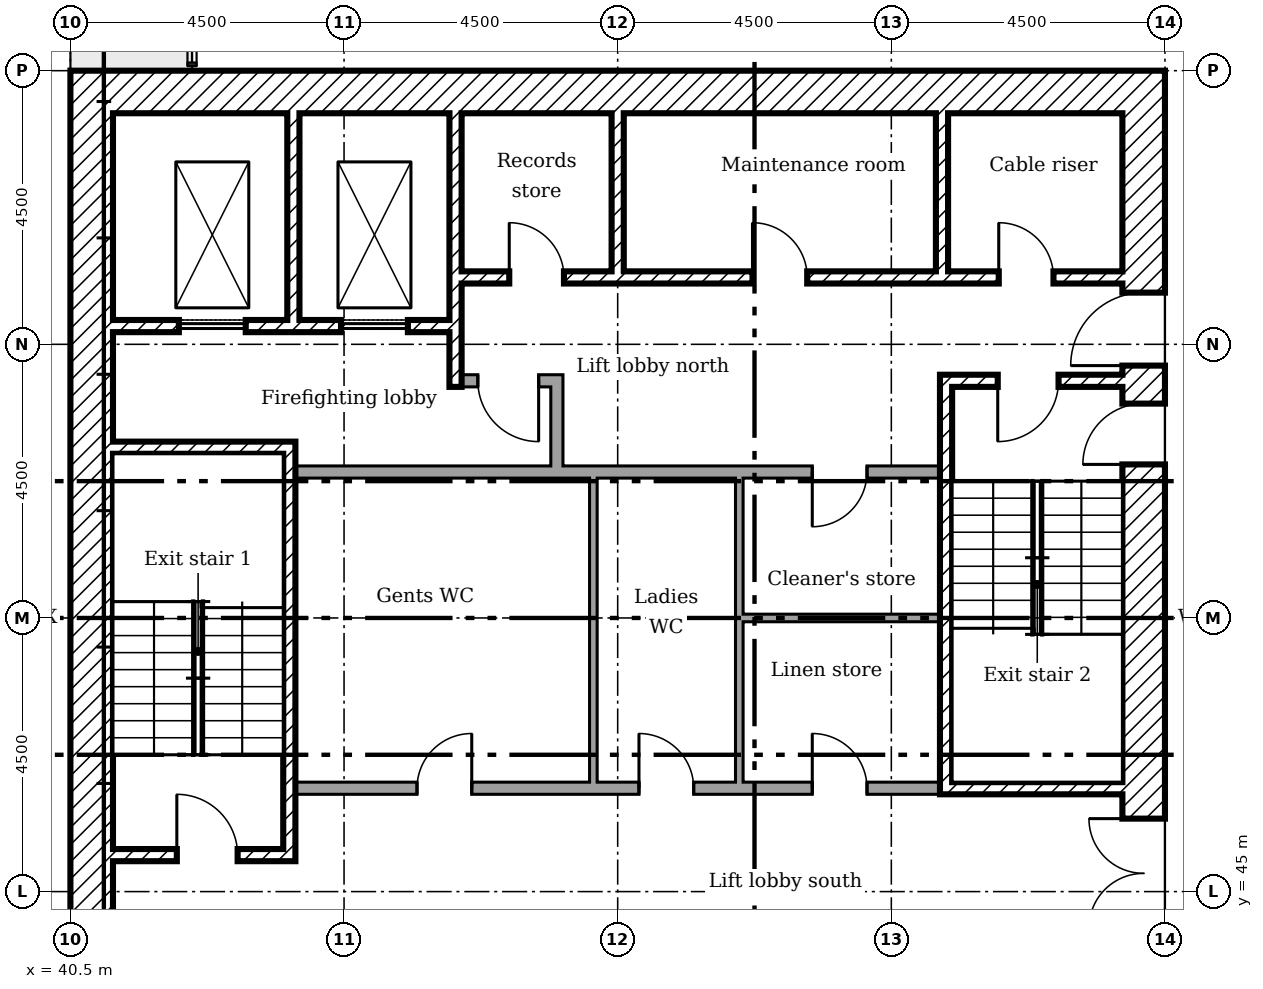
"""IFC4 building model, lengths in metres.
Left out: names, types, materials, properties, quantities, classifications, styles, units other than length and angle.
Written with IfcOpenShell. Run it as: python <this file> out.ifc"""

import sys

from ifc_helpers import new_model, si_unit, direction, frame, frame_2d, origin, place, context, subcontext, project, spatial, rectangle, extrude, element, fill, save


model = new_model("IFC4")
c1 = context("Model", 3, precision=1e-05, world=origin(), true_north=direction((0.0, 1.0)))
c2 = subcontext(c1, "Body", "Model", "MODEL_VIEW")
j1 = project(units=[si_unit("LENGTHUNIT", "METRE"), si_unit("PLANEANGLEUNIT", "RADIAN")], contexts=[c1])
p1 = place(None, origin())
s1 = spatial("IfcSite", under=j1, at=p1, CompositionType="ELEMENT")
p2 = place(p1, origin())
s2 = spatial("IfcBuilding", under=s1, at=p2, CompositionType="ELEMENT")
p3 = place(p2, frame((0.0, 0.0, 128.0)))
s3 = spatial("IfcBuildingStorey", under=s2, at=p3, CompositionType="ELEMENT", Elevation=128.0)
p4 = place(p3, frame((58.15, 40.5, 0.0), z_axis=(0.0, 0.0, 1.0), x_axis=(0.0, 1.0, 0.0)))
e1 = element("IfcWall", 1, at=p4, inside=s3, PredefinedType="SHEAR", context=c2, shape_type="SweptSolid", body=[
    extrude(rectangle(XDim=18.0, YDim=0.7, at=frame_2d((9.0, 0.0))), origin(), (0.0, 0.0, 1.0), 3.35),
])
p5 = place(p4, frame((13.15, 0.0, 0.0)))
e2 = element("IfcOpeningElement", 2, at=p5, cuts=e1, PredefinedType="OPENING", context=c2, shape_type="SweptSolid", body=[
    extrude(rectangle(XDim=1.2, YDim=2.1, at=frame_2d((0.6, 1.05))), frame((0.0, 0.36, 0.0), z_axis=(0.0, -1.0, 0.0), x_axis=(1.0, 0.0, 0.0)), (0.0, 0.0, 1.0), 0.72),
])
p6 = place(p4, frame((3.9, 0.0, 0.0)))
e3 = element("IfcOpeningElement", 3, at=p6, cuts=e1, PredefinedType="OPENING", context=c2, shape_type="SweptSolid", body=[
    extrude(rectangle(XDim=1.8, YDim=2.1, at=frame_2d((0.9, 1.05))), frame((0.0, 0.36, 0.0), z_axis=(0.0, -1.0, 0.0), x_axis=(1.0, 0.0, 0.0)), (0.0, 0.0, 1.0), 0.72),
])
p7 = place(p4, frame((11.525, 0.0, 0.0)))
e4 = element("IfcOpeningElement", 4, at=p7, cuts=e1, PredefinedType="OPENING", context=c2, shape_type="SweptSolid", body=[
    extrude(rectangle(XDim=1.0, YDim=2.1, at=frame_2d((0.5, 1.05))), frame((0.0, 0.36, 0.0), z_axis=(0.0, -1.0, 0.0), x_axis=(1.0, 0.0, 0.0)), (0.0, 0.0, 1.0), 0.72),
])
p8 = place(p3, frame((41.2, 58.15, 0.0)))
e5 = element("IfcWall", 5, at=p8, inside=s3, PredefinedType="SHEAR", context=c2, shape_type="SweptSolid", body=[
    extrude(rectangle(XDim=16.6, YDim=0.7, at=frame_2d((8.3, 0.0))), origin(), (0.0, 0.0, 1.0), 3.35),
])
p9 = place(p3, frame((40.85, 40.5, 0.0), z_axis=(0.0, 0.0, 1.0), x_axis=(0.0, 1.0, 0.0)))
e6 = element("IfcWall", 6, at=p9, inside=s3, PredefinedType="SHEAR", context=c2, shape_type="SweptSolid", body=[
    extrude(rectangle(XDim=18.0, YDim=0.7, at=frame_2d((9.0, 0.0))), origin(), (0.0, 0.0, 1.0), 3.35),
])
p10 = place(p3, frame((44.167, 57.8, 0.0), z_axis=(0.0, 0.0, 1.0), x_axis=(0.0, -1.0, 0.0)))
e7 = element("IfcWall", 7, at=p10, inside=s3, PredefinedType="SHEAR", context=c2, shape_type="SweptSolid", body=[
    extrude(rectangle(XDim=3.4, YDim=0.2, at=frame_2d((1.7, 0.0))), origin(), (0.0, 0.0, 1.0), 3.35),
])
p11 = place(p3, frame((46.833, 57.8, 0.0), z_axis=(0.0, 0.0, 1.0), x_axis=(0.0, -1.0, 0.0)))
e8 = element("IfcWall", 8, at=p11, inside=s3, PredefinedType="SHEAR", context=c2, shape_type="SweptSolid", body=[
    extrude(rectangle(XDim=4.5, YDim=0.2, at=frame_2d((2.25, 0.0))), origin(), (0.0, 0.0, 1.0), 3.35),
])
for number, where, z_axis, x_axis in (
    (9, (49.5, 57.8, 0.0), (0.0, 0.0, 1.0), (0.0, -1.0, 0.0)),
    (10, (54.833, 57.8, 0.0), (0.0, 0.0, 1.0), (0.0, -1.0, 0.0)),
):
    element("IfcWall", number, at=place(p3, frame(where, z_axis=z_axis, x_axis=x_axis)), inside=s3, PredefinedType="SHEAR", context=c2, shape_type="SweptSolid", body=[
        extrude(rectangle(XDim=2.6, YDim=0.2, at=frame_2d((1.3, 0.0))), origin(), (0.0, 0.0, 1.0), 3.35),
    ])
p12 = place(p3, frame((48.5, 51.9, 0.0), z_axis=(0.0, 0.0, 1.0), x_axis=(0.0, 1.0, 0.0)))
e11 = element("IfcWall", 11, at=p12, inside=s3, PredefinedType="PARTITIONING", context=c2, shape_type="SweptSolid", body=[
    extrude(rectangle(XDim=1.6, YDim=0.2, at=frame_2d((0.8, 0.0))), origin(), (0.0, 0.0, 1.0), 3.35),
])
p13 = place(p3, frame((46.933, 53.4, 0.0)))
e12 = element("IfcWall", 12, at=p13, inside=s3, PredefinedType="PARTITIONING", context=c2, shape_type="SweptSolid", body=[
    extrude(rectangle(XDim=1.467, YDim=0.2, at=frame_2d((0.733, 0.0))), origin(), (0.0, 0.0, 1.0), 3.35),
])
p14 = place(p13, frame((0.267, 0.0, 0.0)))
e13 = element("IfcOpeningElement", 13, at=p14, cuts=e12, PredefinedType="OPENING", context=c2, shape_type="SweptSolid", body=[
    extrude(rectangle(XDim=1.0, YDim=2.1, at=frame_2d((0.5, 1.05))), frame((0.0, 0.11, 0.0), z_axis=(0.0, -1.0, 0.0), x_axis=(1.0, 0.0, 0.0)), (0.0, 0.0, 1.0), 0.22),
])
p15 = place(p3, frame((46.933, 55.1, 0.0)))
e14 = element("IfcWall", 14, at=p15, inside=s3, PredefinedType="SHEAR", context=c2, shape_type="SweptSolid", body=[
    extrude(rectangle(XDim=10.867, YDim=0.2, at=frame_2d((5.433, 0.0))), origin(), (0.0, 0.0, 1.0), 3.35),
])
p16 = place(p15, frame((8.833, 0.0, 0.0)))
e15 = element("IfcOpeningElement", 15, at=p16, cuts=e14, PredefinedType="OPENING", context=c2, shape_type="SweptSolid", body=[
    extrude(rectangle(XDim=0.9, YDim=2.1, at=frame_2d((0.45, 1.05))), frame((0.0, 0.11, 0.0), z_axis=(0.0, -1.0, 0.0), x_axis=(1.0, 0.0, 0.0)), (0.0, 0.0, 1.0), 0.22),
])
p17 = place(p15, frame((0.783, 0.0, 0.0)))
e16 = element("IfcOpeningElement", 16, at=p17, cuts=e14, PredefinedType="OPENING", context=c2, shape_type="SweptSolid", body=[
    extrude(rectangle(XDim=0.9, YDim=2.1, at=frame_2d((0.45, 1.05))), frame((0.0, 0.11, 0.0), z_axis=(0.0, -1.0, 0.0), x_axis=(1.0, 0.0, 0.0)), (0.0, 0.0, 1.0), 0.22),
])
p18 = place(p15, frame((4.783, 0.0, 0.0)))
e17 = element("IfcOpeningElement", 17, at=p18, cuts=e14, PredefinedType="OPENING", context=c2, shape_type="SweptSolid", body=[
    extrude(rectangle(XDim=0.9, YDim=2.1, at=frame_2d((0.45, 1.05))), frame((0.0, 0.11, 0.0), z_axis=(0.0, -1.0, 0.0), x_axis=(1.0, 0.0, 0.0)), (0.0, 0.0, 1.0), 0.22),
])
p19 = place(p3, frame((41.2, 54.3, 0.0)))
e18 = element("IfcWall", 18, at=p19, inside=s3, PredefinedType="SHEAR", context=c2, shape_type="SweptSolid", body=[
    extrude(rectangle(XDim=5.533, YDim=0.2, at=frame_2d((2.767, 0.0))), origin(), (0.0, 0.0, 1.0), 3.35),
])
p20 = place(p19, frame((1.083, 0.0, 0.0)))
e19 = element("IfcOpeningElement", 19, at=p20, cuts=e18, PredefinedType="OPENING", context=c2, shape_type="SweptSolid", body=[
    extrude(rectangle(XDim=1.1, YDim=2.1, at=frame_2d((0.55, 1.05))), frame((0.0, 0.11, 0.0), z_axis=(0.0, -1.0, 0.0), x_axis=(1.0, 0.0, 0.0)), (0.0, 0.0, 1.0), 0.22),
])
p21 = place(p19, frame((3.75, 0.0, 0.0)))
e20 = element("IfcOpeningElement", 20, at=p21, cuts=e18, PredefinedType="OPENING", context=c2, shape_type="SweptSolid", body=[
    extrude(rectangle(XDim=1.1, YDim=2.1, at=frame_2d((0.55, 1.05))), frame((0.0, 0.11, 0.0), z_axis=(0.0, -1.0, 0.0), x_axis=(1.0, 0.0, 0.0)), (0.0, 0.0, 1.0), 0.22),
])
p22 = place(p3, frame((44.1, 45.5, 0.0), z_axis=(0.0, 0.0, 1.0), x_axis=(0.0, 1.0, 0.0)))
e21 = element("IfcWall", 21, at=p22, inside=s3, PredefinedType="SHEAR", context=c2, shape_type="SweptSolid", body=[
    extrude(rectangle(XDim=6.9, YDim=0.2, at=frame_2d((3.45, 0.0))), origin(), (0.0, 0.0, 1.0), 3.35),
])
p23 = place(p3, frame((41.2, 52.3, 0.0)))
e22 = element("IfcWall", 22, at=p23, inside=s3, PredefinedType="SHEAR", context=c2, shape_type="SweptSolid", body=[
    extrude(rectangle(XDim=2.8, YDim=0.2, at=frame_2d((1.4, 0.0))), origin(), (0.0, 0.0, 1.0), 3.35),
])
p24 = place(p3, frame((41.2, 45.6, 0.0)))
e23 = element("IfcWall", 23, at=p24, inside=s3, PredefinedType="SHEAR", context=c2, shape_type="SweptSolid", body=[
    extrude(rectangle(XDim=2.8, YDim=0.2, at=frame_2d((1.4, 0.0))), origin(), (0.0, 0.0, 1.0), 3.35),
])
p25 = place(p24, frame((1.05, 0.0, 0.0)))
e24 = element("IfcOpeningElement", 24, at=p25, cuts=e23, PredefinedType="OPENING", context=c2, shape_type="SweptSolid", body=[
    extrude(rectangle(XDim=1.0, YDim=2.1, at=frame_2d((0.5, 1.05))), frame((0.0, 0.11, 0.0), z_axis=(0.0, -1.0, 0.0), x_axis=(1.0, 0.0, 0.0)), (0.0, 0.0, 1.0), 0.22),
])
p26 = place(p3, frame((54.8, 53.4, 0.0)))
e25 = element("IfcWall", 25, at=p26, inside=s3, PredefinedType="SHEAR", context=c2, shape_type="SweptSolid", body=[
    extrude(rectangle(XDim=3.0, YDim=0.2, at=frame_2d((1.5, 0.0))), origin(), (0.0, 0.0, 1.0), 3.35),
])
p27 = place(p26, frame((0.95, 0.0, 0.0)))
e26 = element("IfcOpeningElement", 26, at=p27, cuts=e25, PredefinedType="OPENING", context=c2, shape_type="SweptSolid", body=[
    extrude(rectangle(XDim=1.0, YDim=2.1, at=frame_2d((0.5, 1.05))), frame((0.0, 0.11, 0.0), z_axis=(0.0, -1.0, 0.0), x_axis=(1.0, 0.0, 0.0)), (0.0, 0.0, 1.0), 0.22),
])
p28 = place(p3, frame((54.8, 46.7, 0.0)))
e27 = element("IfcWall", 27, at=p28, inside=s3, PredefinedType="SHEAR", context=c2, shape_type="SweptSolid", body=[
    extrude(rectangle(XDim=3.0, YDim=0.2, at=frame_2d((1.5, 0.0))), origin(), (0.0, 0.0, 1.0), 3.35),
])
p29 = place(p3, frame((54.9, 46.8, 0.0), z_axis=(0.0, 0.0, 1.0), x_axis=(0.0, 1.0, 0.0)))
e28 = element("IfcWall", 28, at=p29, inside=s3, PredefinedType="SHEAR", context=c2, shape_type="SweptSolid", body=[
    extrude(rectangle(XDim=6.5, YDim=0.2, at=frame_2d((3.25, 0.0))), origin(), (0.0, 0.0, 1.0), 3.35),
])
p30 = place(p3, frame((44.2, 51.9, 0.0)))
e29 = element("IfcWall", 29, at=p30, inside=s3, PredefinedType="PARTITIONING", context=c2, shape_type="SweptSolid", body=[
    extrude(rectangle(XDim=10.6, YDim=0.2, at=frame_2d((5.3, 0.0))), origin(), (0.0, 0.0, 1.0), 3.35),
])
p31 = place(p30, frame((8.5, 0.0, 0.0)))
e30 = element("IfcOpeningElement", 30, at=p31, cuts=e29, PredefinedType="OPENING", context=c2, shape_type="SweptSolid", body=[
    extrude(rectangle(XDim=0.9, YDim=2.1, at=frame_2d((0.45, 1.05))), frame((0.0, 0.11, 0.0), z_axis=(0.0, -1.0, 0.0), x_axis=(1.0, 0.0, 0.0)), (0.0, 0.0, 1.0), 0.22),
])
p32 = place(p3, frame((44.2, 46.7, 0.0)))
e31 = element("IfcWall", 31, at=p32, inside=s3, PredefinedType="PARTITIONING", context=c2, shape_type="SweptSolid", body=[
    extrude(rectangle(XDim=10.6, YDim=0.2, at=frame_2d((5.3, 0.0))), origin(), (0.0, 0.0, 1.0), 3.35),
])
p33 = place(p32, frame((2.0, 0.0, 0.0)))
e32 = element("IfcOpeningElement", 32, at=p33, cuts=e31, PredefinedType="OPENING", context=c2, shape_type="SweptSolid", body=[
    extrude(rectangle(XDim=0.9, YDim=2.1, at=frame_2d((0.45, 1.05))), frame((0.0, 0.11, 0.0), z_axis=(0.0, -1.0, 0.0), x_axis=(1.0, 0.0, 0.0)), (0.0, 0.0, 1.0), 0.22),
])
p34 = place(p32, frame((5.65, 0.0, 0.0)))
e33 = element("IfcOpeningElement", 33, at=p34, cuts=e31, PredefinedType="OPENING", context=c2, shape_type="SweptSolid", body=[
    extrude(rectangle(XDim=0.9, YDim=2.1, at=frame_2d((0.45, 1.05))), frame((0.0, 0.11, 0.0), z_axis=(0.0, -1.0, 0.0), x_axis=(1.0, 0.0, 0.0)), (0.0, 0.0, 1.0), 0.22),
])
p35 = place(p32, frame((8.5, 0.0, 0.0)))
e34 = element("IfcOpeningElement", 34, at=p35, cuts=e31, PredefinedType="OPENING", context=c2, shape_type="SweptSolid", body=[
    extrude(rectangle(XDim=0.9, YDim=2.1, at=frame_2d((0.45, 1.05))), frame((0.0, 0.11, 0.0), z_axis=(0.0, -1.0, 0.0), x_axis=(1.0, 0.0, 0.0)), (0.0, 0.0, 1.0), 0.22),
])
p36 = place(p3, frame((49.1, 46.8, 0.0), z_axis=(0.0, 0.0, 1.0), x_axis=(0.0, 1.0, 0.0)))
e35 = element("IfcWall", 35, at=p36, inside=s3, PredefinedType="PARTITIONING", context=c2, shape_type="SweptSolid", body=[
    extrude(rectangle(XDim=5.0, YDim=0.125, at=frame_2d((2.5, 0.0))), origin(), (0.0, 0.0, 1.0), 3.35),
])
p37 = place(p3, frame((51.5, 46.8, 0.0), z_axis=(0.0, 0.0, 1.0), x_axis=(0.0, 1.0, 0.0)))
e36 = element("IfcWall", 36, at=p37, inside=s3, PredefinedType="PARTITIONING", context=c2, shape_type="SweptSolid", body=[
    extrude(rectangle(XDim=2.762, YDim=0.125, at=frame_2d((1.381, 0.0))), origin(), (0.0, 0.0, 1.0), 3.35),
])
p38 = place(p3, frame((51.562, 49.5, 0.0)))
e37 = element("IfcWall", 37, at=p38, inside=s3, PredefinedType="PARTITIONING", context=c2, shape_type="SweptSolid", body=[
    extrude(rectangle(XDim=3.238, YDim=0.125, at=frame_2d((1.619, 0.0))), origin(), (0.0, 0.0, 1.0), 3.35),
])
p39 = place(p3, frame((51.5, 49.5, 0.0), z_axis=(0.0, 0.0, 1.0), x_axis=(0.0, 1.0, 0.0)))
e38 = element("IfcWall", 38, at=p39, inside=s3, PredefinedType="PARTITIONING", context=c2, shape_type="SweptSolid", body=[
    extrude(rectangle(XDim=2.3, YDim=0.125, at=frame_2d((1.15, 0.0))), origin(), (0.0, 0.0, 1.0), 3.35),
])
p40 = place(p5, origin())
e39 = element("IfcDoor", 39, at=p40, inside=s3, OperationType="SINGLE_SWING_RIGHT", PredefinedType="DOOR", context=c2, shape_type="SweptSolid", body=[
    extrude(rectangle(XDim=1.2, YDim=2.1, at=frame_2d((0.6, 1.05))), frame((0.0, 0.025, 0.0), z_axis=(0.0, -1.0, 0.0), x_axis=(1.0, 0.0, 0.0)), (0.0, 0.0, 1.0), 0.05),
])
fill(e2, e39)
p41 = place(p6, origin())
e40 = element("IfcDoor", 40, at=p41, inside=s3, OperationType="DOUBLE_DOOR_SINGLE_SWING", PredefinedType="DOOR", context=c2, shape_type="SweptSolid", body=[
    extrude(rectangle(XDim=1.8, YDim=2.1, at=frame_2d((0.9, 1.05))), frame((0.0, 0.025, 0.0), z_axis=(0.0, -1.0, 0.0), x_axis=(1.0, 0.0, 0.0)), (0.0, 0.0, 1.0), 0.05),
])
fill(e3, e40)
p42 = place(p25, origin())
e41 = element("IfcDoor", 41, at=p42, inside=s3, OperationType="SINGLE_SWING_RIGHT", PredefinedType="DOOR", context=c2, shape_type="SweptSolid", body=[
    extrude(rectangle(XDim=1.0, YDim=2.1, at=frame_2d((0.5, 1.05))), frame((0.0, 0.025, 0.0), z_axis=(0.0, -1.0, 0.0), x_axis=(1.0, 0.0, 0.0)), (0.0, 0.0, 1.0), 0.05),
])
fill(e24, e41)
p43 = place(p27, frame((1.0, 0.0, 0.0), x_axis=(-1.0, 0.0, 0.0)))
e42 = element("IfcDoor", 42, at=p43, inside=s3, OperationType="SINGLE_SWING_LEFT", PredefinedType="DOOR", context=c2, shape_type="SweptSolid", body=[
    extrude(rectangle(XDim=1.0, YDim=2.1, at=frame_2d((0.5, 1.05))), frame((0.0, 0.025, 0.0), z_axis=(0.0, -1.0, 0.0), x_axis=(1.0, 0.0, 0.0)), (0.0, 0.0, 1.0), 0.05),
])
fill(e26, e42)
p44 = place(p7, origin())
e43 = element("IfcDoor", 43, at=p44, inside=s3, OperationType="SINGLE_SWING_RIGHT", PredefinedType="DOOR", context=c2, shape_type="SweptSolid", body=[
    extrude(rectangle(XDim=1.0, YDim=2.1, at=frame_2d((0.5, 1.05))), frame((0.0, 0.025, 0.0), z_axis=(0.0, -1.0, 0.0), x_axis=(1.0, 0.0, 0.0)), (0.0, 0.0, 1.0), 0.05),
])
fill(e4, e43)
p45 = place(p14, frame((1.0, 0.0, 0.0), x_axis=(-1.0, 0.0, 0.0)))
e44 = element("IfcDoor", 44, at=p45, inside=s3, OperationType="SINGLE_SWING_RIGHT", PredefinedType="DOOR", context=c2, shape_type="SweptSolid", body=[
    extrude(rectangle(XDim=1.0, YDim=2.1, at=frame_2d((0.5, 1.05))), frame((0.0, 0.025, 0.0), z_axis=(0.0, -1.0, 0.0), x_axis=(1.0, 0.0, 0.0)), (0.0, 0.0, 1.0), 0.05),
])
fill(e13, e44)
p46 = place(p16, origin())
e45 = element("IfcDoor", 45, at=p46, inside=s3, OperationType="SINGLE_SWING_RIGHT", PredefinedType="DOOR", context=c2, shape_type="SweptSolid", body=[
    extrude(rectangle(XDim=0.9, YDim=2.1, at=frame_2d((0.45, 1.05))), frame((0.0, 0.025, 0.0), z_axis=(0.0, -1.0, 0.0), x_axis=(1.0, 0.0, 0.0)), (0.0, 0.0, 1.0), 0.05),
])
fill(e15, e45)
p47 = place(p17, origin())
e46 = element("IfcDoor", 46, at=p47, inside=s3, OperationType="SINGLE_SWING_RIGHT", PredefinedType="DOOR", context=c2, shape_type="SweptSolid", body=[
    extrude(rectangle(XDim=0.9, YDim=2.1, at=frame_2d((0.45, 1.05))), frame((0.0, 0.025, 0.0), z_axis=(0.0, -1.0, 0.0), x_axis=(1.0, 0.0, 0.0)), (0.0, 0.0, 1.0), 0.05),
])
fill(e16, e46)
p48 = place(p18, origin())
e47 = element("IfcDoor", 47, at=p48, inside=s3, OperationType="SINGLE_SWING_RIGHT", PredefinedType="DOOR", context=c2, shape_type="SweptSolid", body=[
    extrude(rectangle(XDim=0.9, YDim=2.1, at=frame_2d((0.45, 1.05))), frame((0.0, 0.025, 0.0), z_axis=(0.0, -1.0, 0.0), x_axis=(1.0, 0.0, 0.0)), (0.0, 0.0, 1.0), 0.05),
])
fill(e17, e47)
p49 = place(p33, origin())
e48 = element("IfcDoor", 48, at=p49, inside=s3, OperationType="SINGLE_SWING_LEFT", PredefinedType="DOOR", context=c2, shape_type="SweptSolid", body=[
    extrude(rectangle(XDim=0.9, YDim=2.1, at=frame_2d((0.45, 1.05))), frame((0.0, 0.025, 0.0), z_axis=(0.0, -1.0, 0.0), x_axis=(1.0, 0.0, 0.0)), (0.0, 0.0, 1.0), 0.05),
])
fill(e32, e48)
p50 = place(p34, origin())
e49 = element("IfcDoor", 49, at=p50, inside=s3, OperationType="SINGLE_SWING_RIGHT", PredefinedType="DOOR", context=c2, shape_type="SweptSolid", body=[
    extrude(rectangle(XDim=0.9, YDim=2.1, at=frame_2d((0.45, 1.05))), frame((0.0, 0.025, 0.0), z_axis=(0.0, -1.0, 0.0), x_axis=(1.0, 0.0, 0.0)), (0.0, 0.0, 1.0), 0.05),
])
fill(e33, e49)
p51 = place(p31, frame((0.9, 0.0, 0.0), x_axis=(-1.0, 0.0, 0.0)))
e50 = element("IfcDoor", 50, at=p51, inside=s3, OperationType="SINGLE_SWING_LEFT", PredefinedType="DOOR", context=c2, shape_type="SweptSolid", body=[
    extrude(rectangle(XDim=0.9, YDim=2.1, at=frame_2d((0.45, 1.05))), frame((0.0, 0.025, 0.0), z_axis=(0.0, -1.0, 0.0), x_axis=(1.0, 0.0, 0.0)), (0.0, 0.0, 1.0), 0.05),
])
fill(e30, e50)
p52 = place(p35, origin())
e51 = element("IfcDoor", 51, at=p52, inside=s3, OperationType="SINGLE_SWING_RIGHT", PredefinedType="DOOR", context=c2, shape_type="SweptSolid", body=[
    extrude(rectangle(XDim=0.9, YDim=2.1, at=frame_2d((0.45, 1.05))), frame((0.0, 0.025, 0.0), z_axis=(0.0, -1.0, 0.0), x_axis=(1.0, 0.0, 0.0)), (0.0, 0.0, 1.0), 0.05),
])
fill(e34, e51)
p53 = place(p20, origin())
e52 = element("IfcDoor", 52, at=p53, inside=s3, OperationType="SLIDING_TO_LEFT", PredefinedType="DOOR", context=c2, shape_type="SweptSolid", body=[
    extrude(rectangle(XDim=1.1, YDim=2.1, at=frame_2d((0.55, 1.05))), frame((0.0, 0.025, 0.0), z_axis=(0.0, -1.0, 0.0), x_axis=(1.0, 0.0, 0.0)), (0.0, 0.0, 1.0), 0.05),
])
fill(e19, e52)
p54 = place(p21, origin())
e53 = element("IfcDoor", 53, at=p54, inside=s3, OperationType="SLIDING_TO_LEFT", PredefinedType="DOOR", context=c2, shape_type="SweptSolid", body=[
    extrude(rectangle(XDim=1.1, YDim=2.1, at=frame_2d((0.55, 1.05))), frame((0.0, 0.025, 0.0), z_axis=(0.0, -1.0, 0.0), x_axis=(1.0, 0.0, 0.0)), (0.0, 0.0, 1.0), 0.05),
])
fill(e20, e53)
save(model, sys.argv[1])
